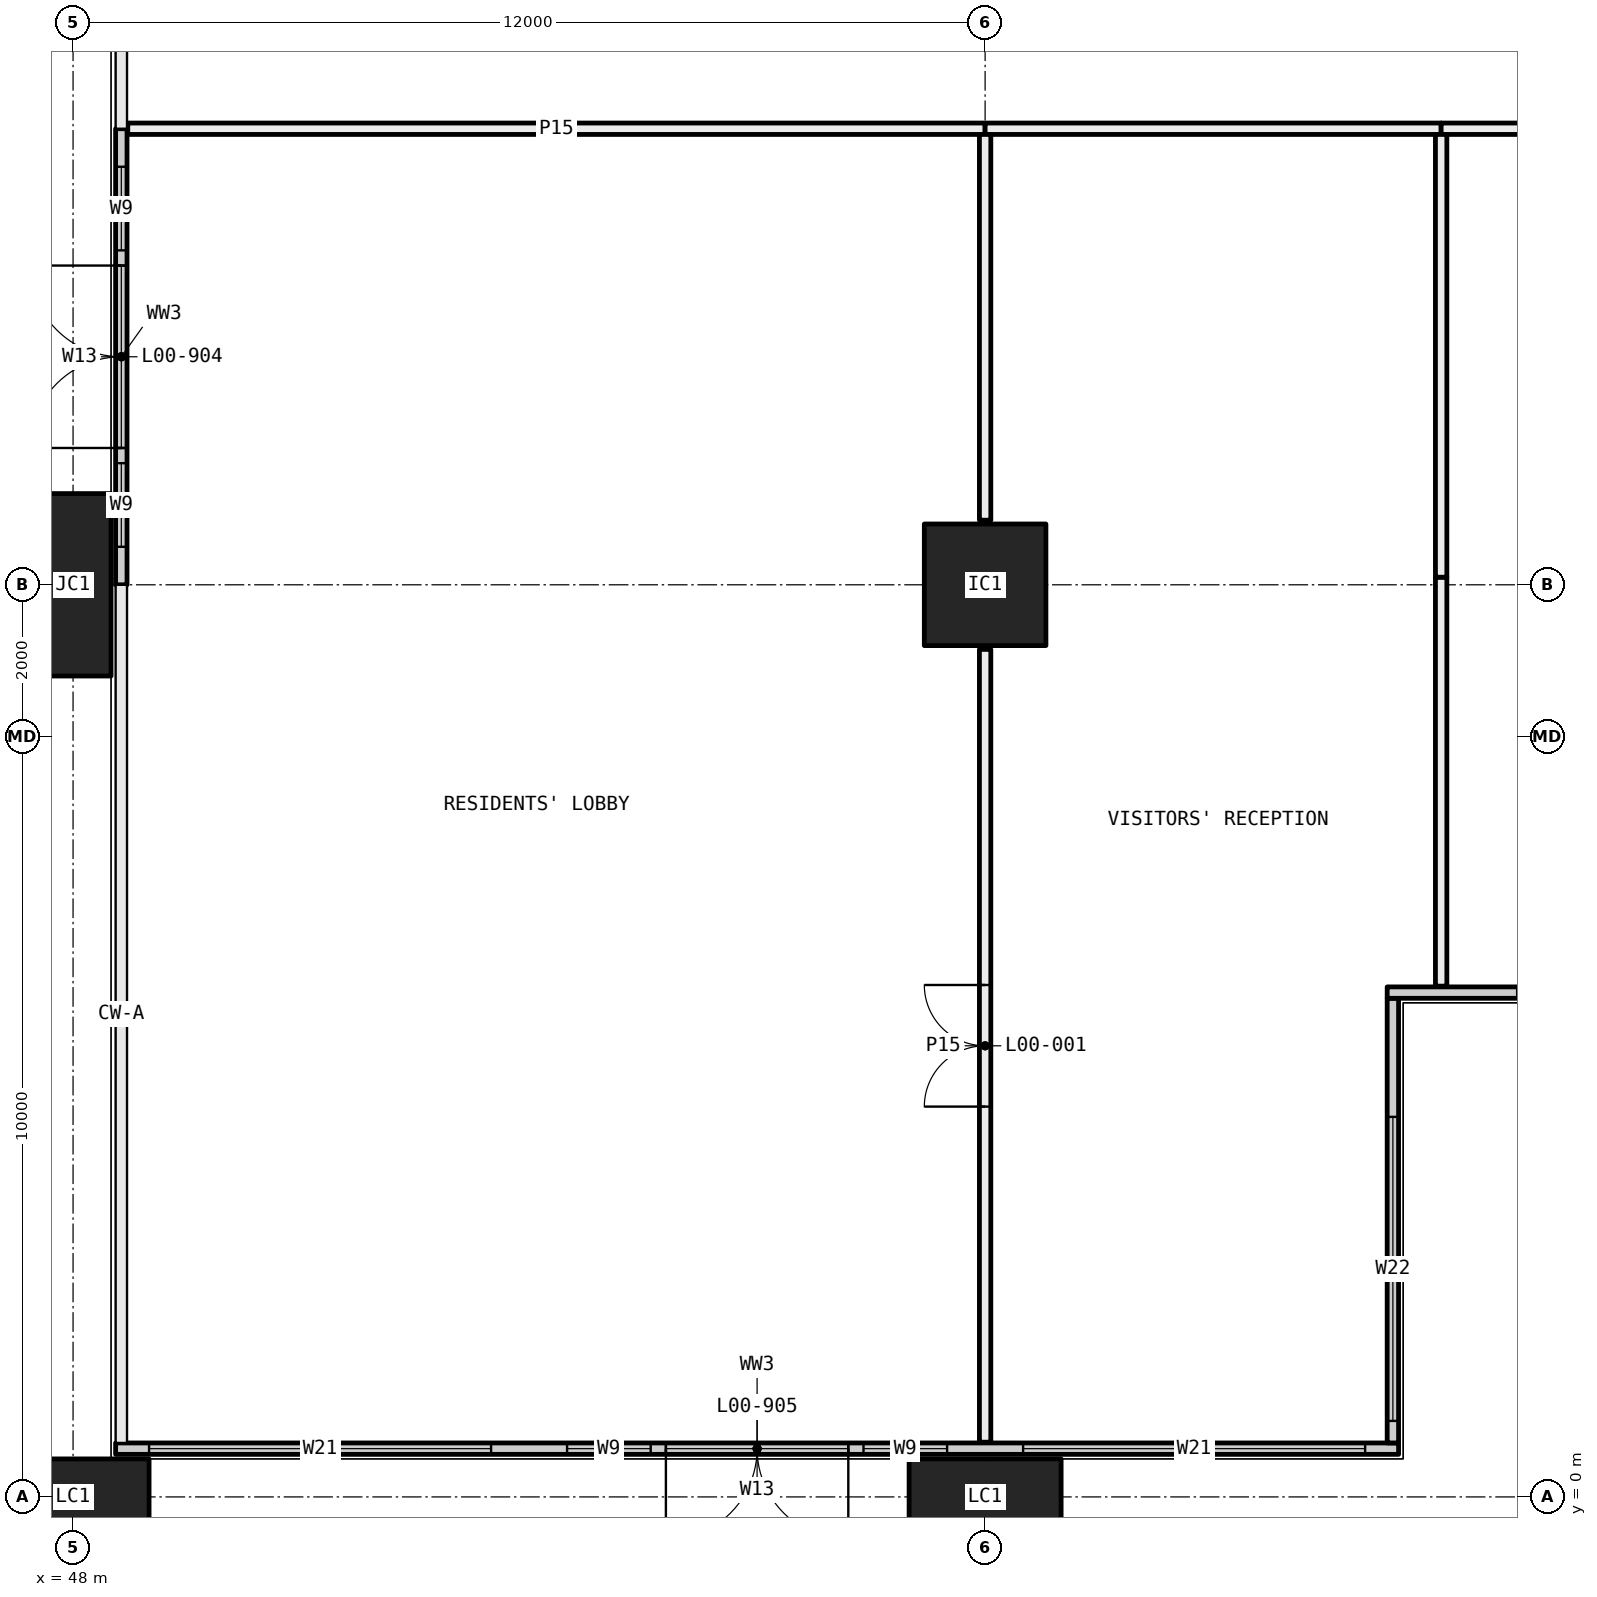
"""IFC4 building model, lengths in metres.
Left out: names, types, materials, properties, quantities, classifications, styles, units other than length and angle.
Written with IfcOpenShell. Run it as: python <this file> out.ifc"""

import sys

from ifc_helpers import new_model, si_unit, direction, frame, frame_2d, origin, origin_2d, place, context, subcontext, project, spatial, rectangle, hollow_rectangle, extrude, element, fill, save


model = new_model("IFC4")
c1 = context("Model", 3, precision=1e-05, world=origin(), true_north=direction((0.0, 1.0)))
c2 = subcontext(c1, "Body", "Model", "MODEL_VIEW")
j1 = project(units=[si_unit("LENGTHUNIT", "METRE"), si_unit("PLANEANGLEUNIT", "RADIAN")], contexts=[c1])
p1 = place(None, origin())
s1 = spatial("IfcSite", under=j1, at=p1, CompositionType="ELEMENT")
p2 = place(p1, origin())
s2 = spatial("IfcBuilding", under=s1, at=p2, CompositionType="ELEMENT")
p3 = place(p2, origin())
s3 = spatial("IfcBuildingStorey", under=s2, at=p3, CompositionType="ELEMENT", Elevation=0.0)
p4 = place(p3, frame((48.0, 0.0, -0.9), z_axis=(0.0, 0.0, 1.0), x_axis=(1.0, 0.0, 0.0)))
e1 = element("IfcColumn", 1, at=p4, inside=s3, PredefinedType="COLUMN", context=c2, shape_type="SweptSolid", body=[
    extrude(hollow_rectangle(XDim=2.0, YDim=1.0, WallThickness=0.08, at=origin_2d()), origin(), (0.0, 0.0, 1.0), 6.5),
])
p5 = place(p3, frame((48.0, 12.0, -0.9), z_axis=(0.0, 0.0, 1.0), x_axis=(0.0, 1.0, 0.0)))
e2 = element("IfcColumn", 2, at=p5, inside=s3, PredefinedType="COLUMN", context=c2, shape_type="SweptSolid", body=[
    extrude(hollow_rectangle(XDim=2.4, YDim=1.0, WallThickness=0.09, at=origin_2d()), origin(), (0.0, 0.0, 1.0), 6.5),
])
p6 = place(p3, frame((60.0, 0.0, -0.9), z_axis=(0.0, 0.0, 1.0), x_axis=(1.0, 0.0, 0.0)))
e3 = element("IfcColumn", 3, at=p6, inside=s3, PredefinedType="COLUMN", context=c2, shape_type="SweptSolid", body=[
    extrude(hollow_rectangle(XDim=2.0, YDim=1.0, WallThickness=0.08, at=origin_2d()), origin(), (0.0, 0.0, 1.0), 6.5),
])
p7 = place(p3, frame((60.0, 12.0, 0.0), z_axis=(0.0, 0.0, 1.0), x_axis=(1.0, 0.0, 0.0)))
e4 = element("IfcColumn", 4, at=p7, inside=s3, PredefinedType="COLUMN", context=c2, shape_type="SweptSolid", body=[
    extrude(hollow_rectangle(XDim=1.6, YDim=1.6, WallThickness=0.07, at=origin_2d()), origin(), (0.0, 0.0, 1.0), 5.6),
])
p8 = place(p3, frame((48.635, 12.0, 0.0), z_axis=(0.0, 0.0, 1.0), x_axis=(0.0, 1.0, 0.0)))
e5 = element("IfcWall", 5, at=p8, inside=s3, PredefinedType="ELEMENTEDWALL", context=c2, shape_type="SweptSolid", body=[
    extrude(rectangle(XDim=6.0, YDim=0.15, at=frame_2d((3.0, 0.0))), origin(), (0.0, 0.0, 1.0), 5.6),
])
p9 = place(p8, frame((0.5, 0.0, 0.45)))
e6 = element("IfcOpeningElement", 6, at=p9, cuts=e5, PredefinedType="OPENING", context=c2, shape_type="SweptSolid", body=[
    extrude(rectangle(XDim=1.1, YDim=5.1, at=frame_2d((0.55, 2.55))), frame((0.0, 0.085, 0.0), z_axis=(0.0, -1.0, 0.0), x_axis=(1.0, 0.0, 0.0)), (0.0, 0.0, 1.0), 0.17),
])
p10 = place(p8, frame((4.4, 0.0, 0.45)))
e7 = element("IfcOpeningElement", 7, at=p10, cuts=e5, PredefinedType="OPENING", context=c2, shape_type="SweptSolid", body=[
    extrude(rectangle(XDim=1.1, YDim=5.1, at=frame_2d((0.55, 2.55))), frame((0.0, 0.085, 0.0), z_axis=(0.0, -1.0, 0.0), x_axis=(1.0, 0.0, 0.0)), (0.0, 0.0, 1.0), 0.17),
])
p11 = place(p8, frame((1.8, 0.0, 0.0)))
e8 = element("IfcOpeningElement", 8, at=p11, cuts=e5, PredefinedType="OPENING", context=c2, shape_type="SweptSolid", body=[
    extrude(rectangle(XDim=2.4, YDim=2.7, at=frame_2d((1.2, 1.35))), frame((0.0, 0.085, 0.0), z_axis=(0.0, -1.0, 0.0), x_axis=(1.0, 0.0, 0.0)), (0.0, 0.0, 1.0), 0.17),
])
p12 = place(p8, frame((1.8, 0.0, 2.9)))
e9 = element("IfcOpeningElement", 9, at=p12, cuts=e5, PredefinedType="OPENING", context=c2, shape_type="SweptSolid", body=[
    extrude(rectangle(XDim=2.4, YDim=2.65, at=frame_2d((1.2, 1.325))), frame((0.0, 0.085, 0.0), z_axis=(0.0, -1.0, 0.0), x_axis=(1.0, 0.0, 0.0)), (0.0, 0.0, 1.0), 0.17),
])
p13 = place(p3, frame((48.56, 0.635, 0.0), z_axis=(0.0, 0.0, 1.0), x_axis=(1.0, 0.0, 0.0)))
e10 = element("IfcWall", 10, at=p13, inside=s3, PredefinedType="ELEMENTEDWALL", context=c2, shape_type="SweptSolid", body=[
    extrude(rectangle(XDim=16.88, YDim=0.15, at=frame_2d((8.44, 0.0))), origin(), (0.0, 0.0, 1.0), 5.6),
])
p14 = place(p13, frame((0.44, 0.0, 0.45)))
e11 = element("IfcOpeningElement", 11, at=p14, cuts=e10, PredefinedType="OPENING", context=c2, shape_type="SweptSolid", body=[
    extrude(rectangle(XDim=4.5, YDim=5.1, at=frame_2d((2.25, 2.55))), frame((0.0, 0.085, 0.0), z_axis=(0.0, -1.0, 0.0), x_axis=(1.0, 0.0, 0.0)), (0.0, 0.0, 1.0), 0.17),
])
p15 = place(p13, frame((5.94, 0.0, 0.45)))
e12 = element("IfcOpeningElement", 12, at=p15, cuts=e10, PredefinedType="OPENING", context=c2, shape_type="SweptSolid", body=[
    extrude(rectangle(XDim=1.1, YDim=5.1, at=frame_2d((0.55, 2.55))), frame((0.0, 0.085, 0.0), z_axis=(0.0, -1.0, 0.0), x_axis=(1.0, 0.0, 0.0)), (0.0, 0.0, 1.0), 0.17),
])
p16 = place(p13, frame((9.84, 0.0, 0.45)))
e13 = element("IfcOpeningElement", 13, at=p16, cuts=e10, PredefinedType="OPENING", context=c2, shape_type="SweptSolid", body=[
    extrude(rectangle(XDim=1.1, YDim=5.1, at=frame_2d((0.55, 2.55))), frame((0.0, 0.085, 0.0), z_axis=(0.0, -1.0, 0.0), x_axis=(1.0, 0.0, 0.0)), (0.0, 0.0, 1.0), 0.17),
])
p17 = place(p13, frame((7.24, 0.0, 0.0)))
e14 = element("IfcOpeningElement", 14, at=p17, cuts=e10, PredefinedType="OPENING", context=c2, shape_type="SweptSolid", body=[
    extrude(rectangle(XDim=2.4, YDim=2.7, at=frame_2d((1.2, 1.35))), frame((0.0, 0.085, 0.0), z_axis=(0.0, -1.0, 0.0), x_axis=(1.0, 0.0, 0.0)), (0.0, 0.0, 1.0), 0.17),
])
p18 = place(p13, frame((7.24, 0.0, 2.9)))
e15 = element("IfcOpeningElement", 15, at=p18, cuts=e10, PredefinedType="OPENING", context=c2, shape_type="SweptSolid", body=[
    extrude(rectangle(XDim=2.4, YDim=2.65, at=frame_2d((1.2, 1.325))), frame((0.0, 0.085, 0.0), z_axis=(0.0, -1.0, 0.0), x_axis=(1.0, 0.0, 0.0)), (0.0, 0.0, 1.0), 0.17),
])
p19 = place(p13, frame((11.94, 0.0, 0.45)))
e16 = element("IfcOpeningElement", 16, at=p19, cuts=e10, PredefinedType="OPENING", context=c2, shape_type="SweptSolid", body=[
    extrude(rectangle(XDim=4.5, YDim=5.1, at=frame_2d((2.25, 2.55))), frame((0.0, 0.085, 0.0), z_axis=(0.0, -1.0, 0.0), x_axis=(1.0, 0.0, 0.0)), (0.0, 0.0, 1.0), 0.17),
])
p20 = place(p3, frame((65.365, 0.71, 0.0), z_axis=(0.0, 0.0, 1.0), x_axis=(0.0, 1.0, 0.0)))
e17 = element("IfcWall", 17, at=p20, inside=s3, PredefinedType="ELEMENTEDWALL", context=c2, shape_type="SweptSolid", body=[
    extrude(rectangle(XDim=5.85, YDim=0.15, at=frame_2d((2.925, 0.0))), origin(), (0.0, 0.0, 1.0), 5.6),
])
p21 = place(p20, frame((0.29, 0.0, 0.45)))
e18 = element("IfcOpeningElement", 18, at=p21, cuts=e17, PredefinedType="OPENING", context=c2, shape_type="SweptSolid", body=[
    extrude(rectangle(XDim=4.0, YDim=5.1, at=frame_2d((2.0, 2.55))), frame((0.0, 0.085, 0.0), z_axis=(0.0, -1.0, 0.0), x_axis=(1.0, 0.0, 0.0)), (0.0, 0.0, 1.0), 0.17),
])
p22 = place(p3, frame((65.29, 6.635, 0.0), z_axis=(0.0, 0.0, 1.0), x_axis=(1.0, 0.0, 0.0)))
e19 = element("IfcWall", 19, at=p22, inside=s3, PredefinedType="ELEMENTEDWALL", context=c2, shape_type="SweptSolid", body=[
    extrude(rectangle(XDim=6.15, YDim=0.15, at=frame_2d((3.075, 0.0))), origin(), (0.0, 0.0, 1.0), 5.6),
])
p23 = place(p22, frame((1.71, 0.0, 0.45)))
e20 = element("IfcOpeningElement", 20, at=p23, cuts=e19, PredefinedType="OPENING", context=c2, shape_type="SweptSolid", body=[
    extrude(rectangle(XDim=4.0, YDim=5.1, at=frame_2d((2.0, 2.55))), frame((0.0, 0.085, 0.0), z_axis=(0.0, -1.0, 0.0), x_axis=(1.0, 0.0, 0.0)), (0.0, 0.0, 1.0), 0.17),
])
p24 = place(p3, frame((48.72, 18.0, 0.0), z_axis=(0.0, 0.0, 1.0), x_axis=(1.0, 0.0, 0.0)))
e21 = element("IfcWall", 21, at=p24, inside=s3, PredefinedType="PARTITIONING", context=c2, shape_type="SweptSolid", body=[
    extrude(rectangle(XDim=11.28, YDim=0.15, at=frame_2d((5.64, 0.0))), origin(), (0.0, 0.0, 1.0), 5.6),
])
p25 = place(p3, frame((60.0, 18.0, 0.0), z_axis=(0.0, 0.0, 1.0), x_axis=(1.0, 0.0, 0.0)))
e22 = element("IfcWall", 22, at=p25, inside=s3, PredefinedType="PARTITIONING", context=c2, shape_type="SweptSolid", body=[
    extrude(rectangle(XDim=6.0, YDim=0.15, at=frame_2d((3.0, 0.0))), origin(), (0.0, 0.0, 1.0), 5.6),
])
p26 = place(p3, frame((66.0, 18.0, 0.0), z_axis=(0.0, 0.0, 1.0), x_axis=(1.0, 0.0, 0.0)))
e23 = element("IfcWall", 23, at=p26, inside=s3, PredefinedType="PARTITIONING", context=c2, shape_type="SweptSolid", body=[
    extrude(rectangle(XDim=5.28, YDim=0.15, at=frame_2d((2.64, 0.0))), origin(), (0.0, 0.0, 1.0), 5.6),
])
p27 = place(p26, frame((2.19, 0.0, 0.0)))
e24 = element("IfcOpeningElement", 24, at=p27, cuts=e23, PredefinedType="OPENING", context=c2, shape_type="SweptSolid", body=[
    extrude(rectangle(XDim=0.9, YDim=2.1, at=frame_2d((0.45, 1.05))), frame((0.0, 0.085, 0.0), z_axis=(0.0, -1.0, 0.0), x_axis=(1.0, 0.0, 0.0)), (0.0, 0.0, 1.0), 0.17),
])
p28 = place(p3, frame((60.0, 0.72, 0.0), z_axis=(0.0, 0.0, 1.0), x_axis=(0.0, 1.0, 0.0)))
e25 = element("IfcWall", 25, at=p28, inside=s3, PredefinedType="PARTITIONING", context=c2, shape_type="SweptSolid", body=[
    extrude(rectangle(XDim=10.43, YDim=0.15, at=frame_2d((5.215, 0.0))), origin(), (0.0, 0.0, 1.0), 5.0),
])
p29 = place(p28, frame((4.415, 0.0, 0.0)))
e26 = element("IfcOpeningElement", 26, at=p29, cuts=e25, PredefinedType="OPENING", context=c2, shape_type="SweptSolid", body=[
    extrude(rectangle(XDim=1.6, YDim=2.1, at=frame_2d((0.8, 1.05))), frame((0.0, 0.085, 0.0), z_axis=(0.0, -1.0, 0.0), x_axis=(1.0, 0.0, 0.0)), (0.0, 0.0, 1.0), 0.17),
])
p30 = place(p3, frame((60.0, 12.85, 0.0), z_axis=(0.0, 0.0, 1.0), x_axis=(0.0, 1.0, 0.0)))
e27 = element("IfcWall", 27, at=p30, inside=s3, PredefinedType="PARTITIONING", context=c2, shape_type="SweptSolid", body=[
    extrude(rectangle(XDim=5.075, YDim=0.15, at=frame_2d((2.538, 0.0))), origin(), (0.0, 0.0, 1.0), 5.6),
])
p31 = place(p3, frame((66.0, 6.72, 0.0), z_axis=(0.0, 0.0, 1.0), x_axis=(0.0, 1.0, 0.0)))
e28 = element("IfcWall", 28, at=p31, inside=s3, PredefinedType="PARTITIONING", context=c2, shape_type="SweptSolid", body=[
    extrude(rectangle(XDim=5.38, YDim=0.15, at=frame_2d((2.69, 0.0))), origin(), (0.0, 0.0, 1.0), 5.0),
])
p32 = place(p3, frame((66.0, 12.1, 0.0), z_axis=(0.0, 0.0, 1.0), x_axis=(0.0, 1.0, 0.0)))
e29 = element("IfcWall", 29, at=p32, inside=s3, PredefinedType="PARTITIONING", context=c2, shape_type="SweptSolid", body=[
    extrude(rectangle(XDim=5.825, YDim=0.15, at=frame_2d((2.913, 0.0))), origin(), (0.0, 0.0, 1.0), 5.6),
])
p33 = place(p9, origin())
e30 = element("IfcWindow", 30, at=p33, inside=s3, PartitioningType="SINGLE_PANEL", PredefinedType="WINDOW", context=c2, shape_type="SweptSolid", body=[
    extrude(rectangle(XDim=1.1, YDim=5.1, at=frame_2d((0.55, 2.55))), frame((0.0, 0.03, 0.0), z_axis=(0.0, -1.0, 0.0), x_axis=(1.0, 0.0, 0.0)), (0.0, 0.0, 1.0), 0.06),
])
fill(e6, e30)
p34 = place(p10, origin())
e31 = element("IfcWindow", 31, at=p34, inside=s3, PartitioningType="SINGLE_PANEL", PredefinedType="WINDOW", context=c2, shape_type="SweptSolid", body=[
    extrude(rectangle(XDim=1.1, YDim=5.1, at=frame_2d((0.55, 2.55))), frame((0.0, 0.03, 0.0), z_axis=(0.0, -1.0, 0.0), x_axis=(1.0, 0.0, 0.0)), (0.0, 0.0, 1.0), 0.06),
])
fill(e7, e31)
p35 = place(p11, origin())
e32 = element("IfcDoor", 32, at=p35, inside=s3, OperationType="DOUBLE_DOOR_SINGLE_SWING", PredefinedType="DOOR", context=c2, shape_type="SweptSolid", body=[
    extrude(rectangle(XDim=2.4, YDim=2.7, at=frame_2d((1.2, 1.35))), frame((0.0, 0.025, 0.0), z_axis=(0.0, -1.0, 0.0), x_axis=(1.0, 0.0, 0.0)), (0.0, 0.0, 1.0), 0.05),
])
fill(e8, e32)
p36 = place(p12, origin())
e33 = element("IfcWindow", 33, at=p36, inside=s3, PartitioningType="SINGLE_PANEL", PredefinedType="WINDOW", context=c2, shape_type="SweptSolid", body=[
    extrude(rectangle(XDim=2.4, YDim=2.65, at=frame_2d((1.2, 1.325))), frame((0.0, 0.03, 0.0), z_axis=(0.0, -1.0, 0.0), x_axis=(1.0, 0.0, 0.0)), (0.0, 0.0, 1.0), 0.06),
])
fill(e9, e33)
p37 = place(p14, origin())
e34 = element("IfcWindow", 34, at=p37, inside=s3, PartitioningType="SINGLE_PANEL", PredefinedType="WINDOW", context=c2, shape_type="SweptSolid", body=[
    extrude(rectangle(XDim=4.5, YDim=5.1, at=frame_2d((2.25, 2.55))), frame((0.0, 0.03, 0.0), z_axis=(0.0, -1.0, 0.0), x_axis=(1.0, 0.0, 0.0)), (0.0, 0.0, 1.0), 0.06),
])
fill(e11, e34)
p38 = place(p15, origin())
e35 = element("IfcWindow", 35, at=p38, inside=s3, PartitioningType="SINGLE_PANEL", PredefinedType="WINDOW", context=c2, shape_type="SweptSolid", body=[
    extrude(rectangle(XDim=1.1, YDim=5.1, at=frame_2d((0.55, 2.55))), frame((0.0, 0.03, 0.0), z_axis=(0.0, -1.0, 0.0), x_axis=(1.0, 0.0, 0.0)), (0.0, 0.0, 1.0), 0.06),
])
fill(e12, e35)
p39 = place(p16, origin())
e36 = element("IfcWindow", 36, at=p39, inside=s3, PartitioningType="SINGLE_PANEL", PredefinedType="WINDOW", context=c2, shape_type="SweptSolid", body=[
    extrude(rectangle(XDim=1.1, YDim=5.1, at=frame_2d((0.55, 2.55))), frame((0.0, 0.03, 0.0), z_axis=(0.0, -1.0, 0.0), x_axis=(1.0, 0.0, 0.0)), (0.0, 0.0, 1.0), 0.06),
])
fill(e13, e36)
p40 = place(p17, frame((2.4, 0.0, 0.0), x_axis=(-1.0, 0.0, 0.0)))
e37 = element("IfcDoor", 37, at=p40, inside=s3, OperationType="DOUBLE_DOOR_SINGLE_SWING", PredefinedType="DOOR", context=c2, shape_type="SweptSolid", body=[
    extrude(rectangle(XDim=2.4, YDim=2.7, at=frame_2d((1.2, 1.35))), frame((0.0, 0.025, 0.0), z_axis=(0.0, -1.0, 0.0), x_axis=(1.0, 0.0, 0.0)), (0.0, 0.0, 1.0), 0.05),
])
fill(e14, e37)
p41 = place(p18, origin())
e38 = element("IfcWindow", 38, at=p41, inside=s3, PartitioningType="SINGLE_PANEL", PredefinedType="WINDOW", context=c2, shape_type="SweptSolid", body=[
    extrude(rectangle(XDim=2.4, YDim=2.65, at=frame_2d((1.2, 1.325))), frame((0.0, 0.03, 0.0), z_axis=(0.0, -1.0, 0.0), x_axis=(1.0, 0.0, 0.0)), (0.0, 0.0, 1.0), 0.06),
])
fill(e15, e38)
p42 = place(p19, origin())
e39 = element("IfcWindow", 39, at=p42, inside=s3, PartitioningType="SINGLE_PANEL", PredefinedType="WINDOW", context=c2, shape_type="SweptSolid", body=[
    extrude(rectangle(XDim=4.5, YDim=5.1, at=frame_2d((2.25, 2.55))), frame((0.0, 0.03, 0.0), z_axis=(0.0, -1.0, 0.0), x_axis=(1.0, 0.0, 0.0)), (0.0, 0.0, 1.0), 0.06),
])
fill(e16, e39)
p43 = place(p21, origin())
e40 = element("IfcWindow", 40, at=p43, inside=s3, PartitioningType="SINGLE_PANEL", PredefinedType="WINDOW", context=c2, shape_type="SweptSolid", body=[
    extrude(rectangle(XDim=4.0, YDim=5.1, at=frame_2d((2.0, 2.55))), frame((0.0, 0.03, 0.0), z_axis=(0.0, -1.0, 0.0), x_axis=(1.0, 0.0, 0.0)), (0.0, 0.0, 1.0), 0.06),
])
fill(e18, e40)
p44 = place(p29, origin())
e41 = element("IfcDoor", 41, at=p44, inside=s3, OperationType="DOUBLE_DOOR_SINGLE_SWING", PredefinedType="DOOR", context=c2, shape_type="SweptSolid", body=[
    extrude(rectangle(XDim=1.6, YDim=2.1, at=frame_2d((0.8, 1.05))), frame((0.0, 0.025, 0.0), z_axis=(0.0, -1.0, 0.0), x_axis=(1.0, 0.0, 0.0)), (0.0, 0.0, 1.0), 0.05),
])
fill(e26, e41)
save(model, sys.argv[1])
